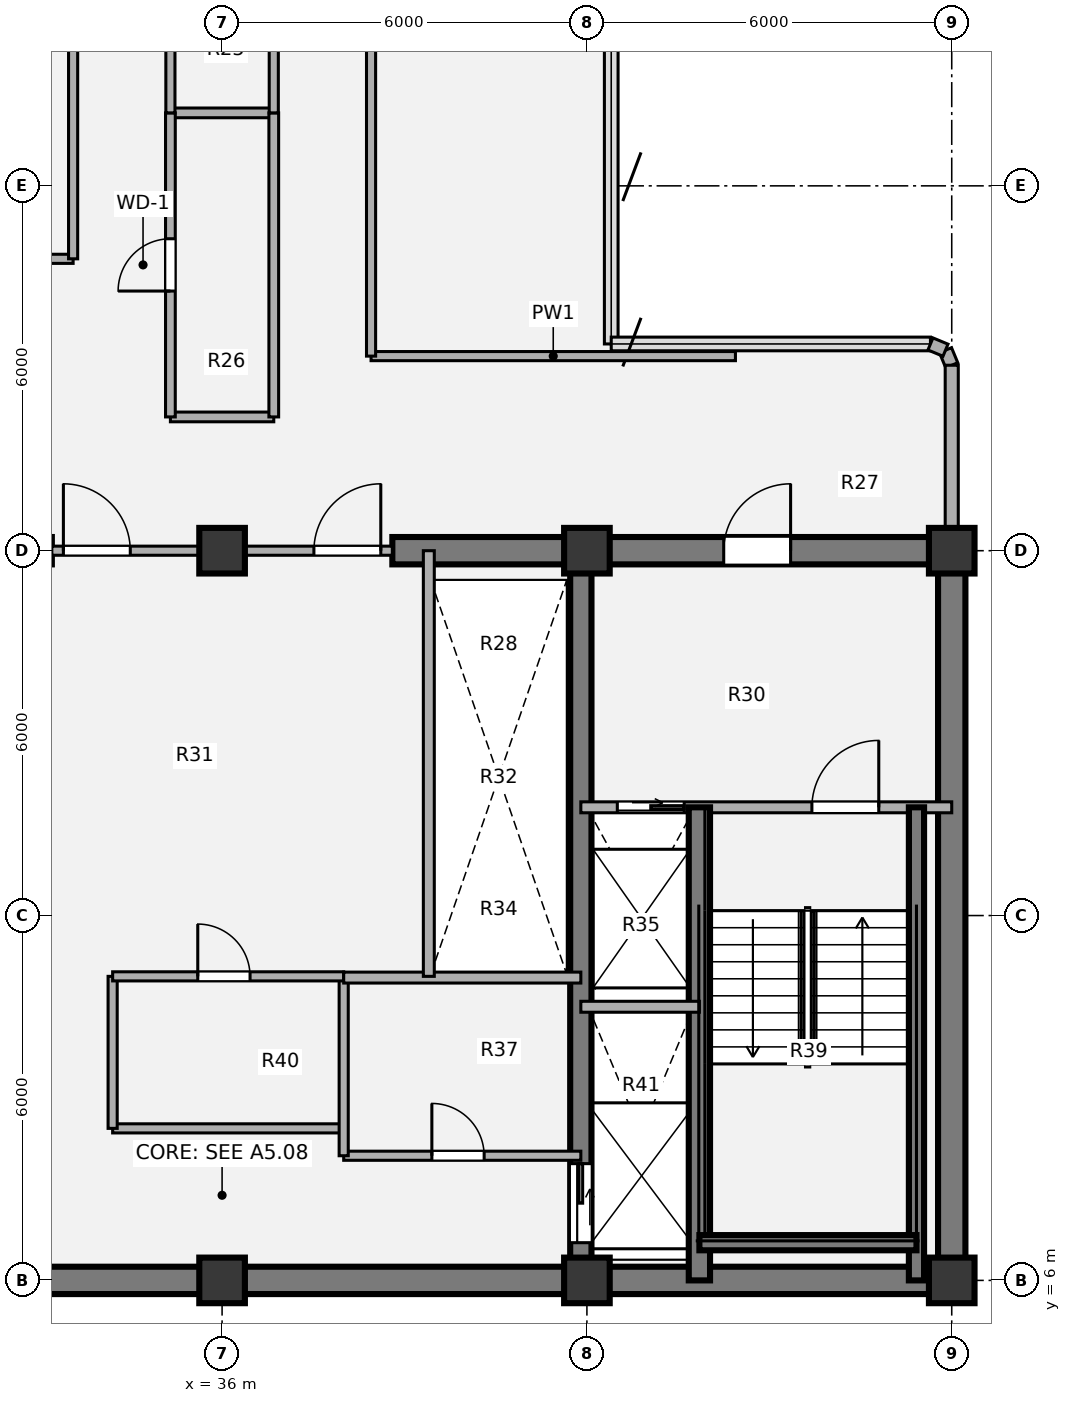
"""IFC4 building model, lengths in metres.
Left out: names, types, materials, properties, quantities, classifications, styles, units other than length and angle.
Written with IfcOpenShell. Run it as: python <this file> out.ifc"""

import sys

from ifc_helpers import new_model, si_unit, direction, frame, frame_2d, origin, origin_2d, place, context, subcontext, project, spatial, rectangle, extrude, source, transform, mapped, element, fill, save


model = new_model("IFC4")
c1 = context("Model", 3, precision=1e-05, world=origin(), true_north=direction((0.0, 1.0)))
c2 = subcontext(c1, "Body", "Model", "MODEL_VIEW")
j1 = project(units=[si_unit("LENGTHUNIT", "METRE"), si_unit("PLANEANGLEUNIT", "RADIAN")], contexts=[c1])
p1 = place(None, origin())
s1 = spatial("IfcSite", under=j1, at=p1, CompositionType="ELEMENT")
p2 = place(p1, origin())
s2 = spatial("IfcBuilding", under=s1, at=p2, CompositionType="ELEMENT")
p3 = place(p2, frame((0.0, 0.0, 209.34)))
s3 = spatial("IfcBuildingStorey", under=s2, at=p3, CompositionType="ELEMENT", Elevation=209.34)
m1 = source(origin(), c2, "Body", "SweptSolid", [
    extrude(rectangle(XDim=0.75, YDim=0.75, at=origin_2d()), origin(), (0.0, 0.0, 1.0), 3.78),
])
for number, where, z_axis, x_axis in (
    (1, (36.0, 6.0, 0.0), (0.0, 0.0, 1.0), (1.0, 0.0, 0.0)),
    (2, (42.0, 6.0, 0.0), (0.0, 0.0, 1.0), (1.0, 0.0, 0.0)),
    (3, (48.0, 6.0, 0.0), (0.0, 0.0, 1.0), (1.0, 0.0, 0.0)),
    (4, (36.0, 18.0, 0.0), (0.0, 0.0, 1.0), (1.0, 0.0, 0.0)),
    (5, (42.0, 18.0, 0.0), (0.0, 0.0, 1.0), (1.0, 0.0, 0.0)),
    (6, (48.0, 18.0, 0.0), (0.0, 0.0, 1.0), (1.0, 0.0, 0.0)),
):
    element("IfcColumn", number, at=place(p3, frame(where, z_axis=z_axis, x_axis=x_axis)), inside=s3, PredefinedType="COLUMN", context=c2, shape_type="MappedRepresentation", body=[
        mapped(m1, transform((0.0, 0.0, 0.0), x_axis=(1.0, 0.0, 0.0), y_axis=(0.0, 1.0, 0.0), z_axis=(0.0, 0.0, 1.0), scale=1.0)),
    ])
p4 = place(p3, frame((48.225, 6.0, 0.0), z_axis=(0.0, 0.0, 1.0), x_axis=(-1.0, 0.0, 0.0)))
e7 = element("IfcWall", 7, at=p4, inside=s3, PredefinedType="SHEAR", context=c2, shape_type="SweptSolid", body=[
    extrude(rectangle(XDim=24.45, YDim=0.45, at=frame_2d((12.225, 0.0))), origin(), (0.0, 0.0, 1.0), 3.78),
])
p5 = place(p3, frame((48.0, 18.0, 0.0), z_axis=(0.0, 0.0, 1.0), x_axis=(0.0, -1.0, 0.0)))
e8 = element("IfcWall", 8, at=p5, inside=s3, PredefinedType="SHEAR", context=c2, shape_type="SweptSolid", body=[
    extrude(rectangle(XDim=12.0, YDim=0.45, at=frame_2d((6.0, 0.0))), origin(), (0.0, 0.0, 1.0), 3.78),
])
p6 = place(p3, frame((38.8, 18.0, 0.0), z_axis=(0.0, 0.0, 1.0), x_axis=(1.0, 0.0, 0.0)))
e9 = element("IfcWall", 9, at=p6, inside=s3, PredefinedType="SHEAR", context=c2, shape_type="SweptSolid", body=[
    extrude(rectangle(XDim=9.425, YDim=0.45, at=frame_2d((4.712, 0.0))), origin(), (0.0, 0.0, 1.0), 3.78),
])
p7 = place(p6, frame((5.45, 0.0, 0.0)))
e10 = element("IfcOpeningElement", 10, at=p7, cuts=e9, PredefinedType="OPENING", context=c2, shape_type="SweptSolid", body=[
    extrude(rectangle(XDim=1.1, YDim=2.1, at=origin_2d()), frame((0.55, 0.235, 1.05), z_axis=(0.0, -1.0, 0.0), x_axis=(1.0, 0.0, 0.0)), (0.0, 0.0, 1.0), 0.47),
])
p8 = place(p3, frame((41.9, 18.0, 0.0), z_axis=(0.0, 0.0, 1.0), x_axis=(0.0, -1.0, 0.0)))
e11 = element("IfcWall", 11, at=p8, inside=s3, PredefinedType="SHEAR", context=c2, shape_type="SweptSolid", body=[
    extrude(rectangle(XDim=12.0, YDim=0.35, at=frame_2d((6.0, 0.0))), origin(), (0.0, 0.0, 1.0), 3.78),
])
p9 = place(p8, frame((10.08, 0.0, 0.0)))
e12 = element("IfcOpeningElement", 12, at=p9, cuts=e11, PredefinedType="OPENING", context=c2, shape_type="SweptSolid", body=[
    extrude(rectangle(XDim=1.3, YDim=2.1, at=origin_2d()), frame((0.65, 0.185, 1.05), z_axis=(0.0, -1.0, 0.0), x_axis=(1.0, 0.0, 0.0)), (0.0, 0.0, 1.0), 0.37),
])
p10 = place(p3, frame((47.897, 21.298, 0.0), z_axis=(0.0, 0.0, 1.0), x_axis=(0.382673670509, -0.923883575944, 0.0)))
e13 = element("IfcWall", 13, at=p10, inside=s3, PredefinedType="SOLIDWALL", context=c2, shape_type="SweptSolid", body=[
    extrude(rectangle(XDim=0.268, YDim=0.215, at=frame_2d((0.134, 0.0))), origin(), (0.0, 0.0, 1.0), 3.372),
])
p11 = place(p3, frame((48.0, 21.05, 0.0), z_axis=(0.0, 0.0, 1.0), x_axis=(0.0, -1.0, 0.0)))
e14 = element("IfcWall", 14, at=p11, inside=s3, PredefinedType="SOLIDWALL", context=c2, shape_type="SweptSolid", body=[
    extrude(rectangle(XDim=2.695, YDim=0.215, at=frame_2d((1.348, 0.0))), origin(), (0.0, 0.0, 1.0), 1.86),
])
p12 = place(p3, frame((47.65, 21.4, 0.0), z_axis=(0.0, 0.0, 1.0), x_axis=(0.924205486139, -0.381895560841, 0.0)))
e15 = element("IfcWall", 15, at=p12, inside=s3, PredefinedType="SOLIDWALL", context=c2, shape_type="SweptSolid", body=[
    extrude(rectangle(XDim=0.268, YDim=0.215, at=frame_2d((0.134, 0.0))), origin(), (0.0, 0.0, 1.0), 3.372),
])
p13 = place(p3, frame((34.2, 8.5, 0.0), z_axis=(0.0, 0.0, 1.0), x_axis=(1.0, 0.0, 0.0)))
e16 = element("IfcWall", 16, at=p13, inside=s3, PredefinedType="PARTITIONING", context=c2, shape_type="SweptSolid", body=[
    extrude(rectangle(XDim=3.8, YDim=0.15, at=frame_2d((1.9, 0.0))), origin(), (0.0, 0.0, 1.0), 3.342),
])
p14 = place(p3, frame((38.0, 8.05, 0.0), z_axis=(0.0, 0.0, 1.0), x_axis=(1.0, 0.0, 0.0)))
e17 = element("IfcWall", 17, at=p14, inside=s3, PredefinedType="PARTITIONING", context=c2, shape_type="SweptSolid", body=[
    extrude(rectangle(XDim=3.9, YDim=0.15, at=frame_2d((1.95, 0.0))), origin(), (0.0, 0.0, 1.0), 3.342),
])
p15 = place(p14, frame((1.45, 0.0, 0.0)))
e18 = element("IfcOpeningElement", 18, at=p15, cuts=e17, PredefinedType="OPENING", context=c2, shape_type="SweptSolid", body=[
    extrude(rectangle(XDim=0.86, YDim=2.1, at=origin_2d()), frame((0.43, 0.085, 1.05), z_axis=(0.0, -1.0, 0.0), x_axis=(1.0, 0.0, 0.0)), (0.0, 0.0, 1.0), 0.17),
])
p16 = place(p3, frame((34.2, 8.5, 0.0), z_axis=(0.0, 0.0, 1.0), x_axis=(0.0, 1.0, 0.0)))
e19 = element("IfcWall", 19, at=p16, inside=s3, PredefinedType="PARTITIONING", context=c2, shape_type="SweptSolid", body=[
    extrude(rectangle(XDim=2.5, YDim=0.15, at=frame_2d((1.25, 0.0))), origin(), (0.0, 0.0, 1.0), 3.342),
])
p17 = place(p3, frame((38.0, 8.05, 0.0), z_axis=(0.0, 0.0, 1.0), x_axis=(0.0, 1.0, 0.0)))
e20 = element("IfcWall", 20, at=p17, inside=s3, PredefinedType="PARTITIONING", context=c2, shape_type="SweptSolid", body=[
    extrude(rectangle(XDim=2.95, YDim=0.15, at=frame_2d((1.475, 0.0))), origin(), (0.0, 0.0, 1.0), 3.342),
])
p18 = place(p3, frame((34.2, 11.0, 0.0), z_axis=(0.0, 0.0, 1.0), x_axis=(1.0, 0.0, 0.0)))
e21 = element("IfcWall", 21, at=p18, inside=s3, PredefinedType="PARTITIONING", context=c2, shape_type="SweptSolid", body=[
    extrude(rectangle(XDim=3.8, YDim=0.15, at=frame_2d((1.9, 0.0))), origin(), (0.0, 0.0, 1.0), 3.342),
])
p19 = place(p18, frame((1.4, 0.0, 0.0)))
e22 = element("IfcOpeningElement", 22, at=p19, cuts=e21, PredefinedType="OPENING", context=c2, shape_type="SweptSolid", body=[
    extrude(rectangle(XDim=0.86, YDim=2.1, at=origin_2d()), frame((0.43, 0.085, 1.05), z_axis=(0.0, -1.0, 0.0), x_axis=(1.0, 0.0, 0.0)), (0.0, 0.0, 1.0), 0.17),
])
p20 = place(p3, frame((38.0, 10.98, 0.0), z_axis=(0.0, 0.0, 1.0), x_axis=(1.0, 0.0, 0.0)))
e23 = element("IfcWall", 23, at=p20, inside=s3, PredefinedType="PARTITIONING", context=c2, shape_type="SweptSolid", body=[
    extrude(rectangle(XDim=3.9, YDim=0.18, at=frame_2d((1.95, 0.0))), origin(), (0.0, 0.0, 1.0), 3.342),
])
p21 = place(p3, frame((39.4, 11.0, 0.0), z_axis=(0.0, 0.0, 1.0), x_axis=(0.0, 1.0, 0.0)))
e24 = element("IfcWall", 24, at=p21, inside=s3, PredefinedType="PARTITIONING", context=c2, shape_type="SweptSolid", body=[
    extrude(rectangle(XDim=7.0, YDim=0.18, at=frame_2d((3.5, 0.0))), origin(), (0.0, 0.0, 1.0), 3.342),
])
p22 = place(p3, frame((33.2, 18.0, 0.0), z_axis=(0.0, 0.0, 1.0), x_axis=(1.0, 0.0, 0.0)))
e25 = element("IfcWall", 25, at=p22, inside=s3, PredefinedType="PARTITIONING", context=c2, shape_type="SweptSolid", body=[
    extrude(rectangle(XDim=5.6, YDim=0.15, at=frame_2d((2.8, 0.0))), origin(), (0.0, 0.0, 1.0), 2.357),
])
p23 = place(p22, frame((0.19, 0.0, 0.0)))
e26 = element("IfcOpeningElement", 26, at=p23, cuts=e25, PredefinedType="OPENING", context=c2, shape_type="SweptSolid", body=[
    extrude(rectangle(XDim=1.1, YDim=2.1, at=origin_2d()), frame((0.55, 0.085, 1.05), z_axis=(0.0, -1.0, 0.0), x_axis=(1.0, 0.0, 0.0)), (0.0, 0.0, 1.0), 0.17),
])
p24 = place(p22, frame((4.31, 0.0, 0.0)))
e27 = element("IfcOpeningElement", 27, at=p24, cuts=e25, PredefinedType="OPENING", context=c2, shape_type="SweptSolid", body=[
    extrude(rectangle(XDim=1.1, YDim=2.1, at=origin_2d()), frame((0.55, 0.085, 1.05), z_axis=(0.0, -1.0, 0.0), x_axis=(1.0, 0.0, 0.0)), (0.0, 0.0, 1.0), 0.17),
])
p25 = place(p3, frame((41.9, 13.78, 0.0), z_axis=(0.0, 0.0, 1.0), x_axis=(1.0, 0.0, 0.0)))
e28 = element("IfcWall", 28, at=p25, inside=s3, PredefinedType="PARTITIONING", context=c2, shape_type="SweptSolid", body=[
    extrude(rectangle(XDim=6.1, YDim=0.18, at=frame_2d((3.05, 0.0))), origin(), (0.0, 0.0, 1.0), 3.342),
])
p26 = place(p25, frame((0.6, 0.0, 0.0)))
e29 = element("IfcOpeningElement", 29, at=p26, cuts=e28, PredefinedType="OPENING", context=c2, shape_type="SweptSolid", body=[
    extrude(rectangle(XDim=1.1, YDim=2.1, at=origin_2d()), frame((0.55, 0.1, 1.05), z_axis=(0.0, -1.0, 0.0), x_axis=(1.0, 0.0, 0.0)), (0.0, 0.0, 1.0), 0.2),
])
p27 = place(p25, frame((3.8, 0.0, 0.0)))
e30 = element("IfcOpeningElement", 30, at=p27, cuts=e28, PredefinedType="OPENING", context=c2, shape_type="SweptSolid", body=[
    extrude(rectangle(XDim=1.1, YDim=2.1, at=origin_2d()), frame((0.55, 0.1, 1.05), z_axis=(0.0, -1.0, 0.0), x_axis=(1.0, 0.0, 0.0)), (0.0, 0.0, 1.0), 0.2),
])
p28 = place(p3, frame((43.85, 6.0, 0.0), z_axis=(0.0, 0.0, 1.0), x_axis=(0.0, 1.0, 0.0)))
e31 = element("IfcWall", 31, at=p28, inside=s3, PredefinedType="SHEAR", context=c2, shape_type="SweptSolid", body=[
    extrude(rectangle(XDim=7.78, YDim=0.35, at=frame_2d((3.89, 0.0))), origin(), (0.0, 0.0, 1.0), 3.692),
])
p29 = place(p3, frame((47.42, 6.0, 0.0), z_axis=(0.0, 0.0, 1.0), x_axis=(0.0, 1.0, 0.0)))
e32 = element("IfcWall", 32, at=p29, inside=s3, PredefinedType="SHEAR", context=c2, shape_type="SweptSolid", body=[
    extrude(rectangle(XDim=7.78, YDim=0.25, at=frame_2d((3.89, 0.0))), origin(), (0.0, 0.0, 1.0), 3.692),
])
p30 = place(p3, frame((43.85, 6.62, 0.0), z_axis=(0.0, 0.0, 1.0), x_axis=(1.0, 0.0, 0.0)))
e33 = element("IfcWall", 33, at=p30, inside=s3, PredefinedType="SHEAR", context=c2, shape_type="SweptSolid", body=[
    extrude(rectangle(XDim=3.57, YDim=0.25, at=frame_2d((1.785, 0.0))), origin(), (0.0, 0.0, 1.0), 3.692),
])
p31 = place(p3, frame((41.9, 10.5, 0.0), z_axis=(0.0, 0.0, 1.0), x_axis=(1.0, 0.0, 0.0)))
e34 = element("IfcWall", 34, at=p31, inside=s3, PredefinedType="PARTITIONING", context=c2, shape_type="SweptSolid", body=[
    extrude(rectangle(XDim=1.95, YDim=0.18, at=frame_2d((0.975, 0.0))), origin(), (0.0, 0.0, 1.0), 3.342),
])
p32 = place(p3, frame((35.15, 20.2, 0.0), z_axis=(0.0, 0.0, 1.0), x_axis=(1.0, 0.0, 0.0)))
e35 = element("IfcWall", 35, at=p32, inside=s3, PredefinedType="PLUMBINGWALL", context=c2, shape_type="SweptSolid", body=[
    extrude(rectangle(XDim=1.7, YDim=0.16, at=frame_2d((0.85, 0.0))), origin(), (0.0, 0.0, 1.0), 3.342),
])
p33 = place(p3, frame((38.45, 21.2, 0.0), z_axis=(0.0, 0.0, 1.0), x_axis=(1.0, 0.0, 0.0)))
e36 = element("IfcWall", 36, at=p33, inside=s3, PredefinedType="PARTITIONING", context=c2, shape_type="SweptSolid", body=[
    extrude(rectangle(XDim=5.993, YDim=0.15, at=frame_2d((2.996, 0.0))), origin(), (0.0, 0.0, 1.0), 3.342),
])
p34 = place(p3, frame((29.68, 22.8, 0.0), z_axis=(0.0, 0.0, 1.0), x_axis=(1.0, 0.0, 0.0)))
e37 = element("IfcWall", 37, at=p34, inside=s3, PredefinedType="PARTITIONING", context=c2, shape_type="SweptSolid", body=[
    extrude(rectangle(XDim=3.87, YDim=0.15, at=frame_2d((1.935, 0.0))), origin(), (0.0, 0.0, 1.0), 3.342),
])
p35 = place(p3, frame((35.15, 25.2, 0.0), z_axis=(0.0, 0.0, 1.0), x_axis=(1.0, 0.0, 0.0)))
e38 = element("IfcWall", 38, at=p35, inside=s3, PredefinedType="PLUMBINGWALL", context=c2, shape_type="SweptSolid", body=[
    extrude(rectangle(XDim=1.7, YDim=0.16, at=frame_2d((0.85, 0.0))), origin(), (0.0, 0.0, 1.0), 3.342),
])
p36 = place(p3, frame((33.55, 22.8, 0.0), z_axis=(0.0, 0.0, 1.0), x_axis=(0.0, 1.0, 0.0)))
e39 = element("IfcWall", 39, at=p36, inside=s3, PredefinedType="PARTITIONING", context=c2, shape_type="SweptSolid", body=[
    extrude(rectangle(XDim=9.8, YDim=0.15, at=frame_2d((4.9, 0.0))), origin(), (0.0, 0.0, 1.0), 3.342),
])
p37 = place(p36, frame((4.34, 0.0, 0.0)))
e40 = element("IfcOpeningElement", 40, at=p37, cuts=e39, PredefinedType="OPENING", context=c2, shape_type="SweptSolid", body=[
    extrude(rectangle(XDim=0.86, YDim=2.1, at=origin_2d()), frame((0.43, 0.085, 1.05), z_axis=(0.0, -1.0, 0.0), x_axis=(1.0, 0.0, 0.0)), (0.0, 0.0, 1.0), 0.17),
])
p38 = place(p3, frame((35.15, 20.2, 0.0), z_axis=(0.0, 0.0, 1.0), x_axis=(0.0, 1.0, 0.0)))
e41 = element("IfcWall", 41, at=p38, inside=s3, PredefinedType="PLUMBINGWALL", context=c2, shape_type="SweptSolid", body=[
    extrude(rectangle(XDim=5.0, YDim=0.16, at=frame_2d((2.5, 0.0))), origin(), (0.0, 0.0, 1.0), 3.342),
])
p39 = place(p38, frame((2.07, 0.0, 0.0)))
e42 = element("IfcOpeningElement", 42, at=p39, cuts=e41, PredefinedType="OPENING", context=c2, shape_type="SweptSolid", body=[
    extrude(rectangle(XDim=0.86, YDim=2.1, at=origin_2d()), frame((0.43, 0.09, 1.05), z_axis=(0.0, -1.0, 0.0), x_axis=(1.0, 0.0, 0.0)), (0.0, 0.0, 1.0), 0.18),
])
p40 = place(p3, frame((35.15, 25.2, 0.0), z_axis=(0.0, 0.0, 1.0), x_axis=(0.0, 1.0, 0.0)))
e43 = element("IfcWall", 43, at=p40, inside=s3, PredefinedType="PARTITIONING", context=c2, shape_type="SweptSolid", body=[
    extrude(rectangle(XDim=15.46, YDim=0.15, at=frame_2d((7.73, 0.0))), origin(), (0.0, 0.0, 1.0), 3.342),
])
p41 = place(p3, frame((36.85, 20.2, 0.0), z_axis=(0.0, 0.0, 1.0), x_axis=(0.0, 1.0, 0.0)))
e44 = element("IfcWall", 44, at=p41, inside=s3, PredefinedType="PLUMBINGWALL", context=c2, shape_type="SweptSolid", body=[
    extrude(rectangle(XDim=5.0, YDim=0.16, at=frame_2d((2.5, 0.0))), origin(), (0.0, 0.0, 1.0), 3.342),
])
p42 = place(p3, frame((36.85, 25.2, 0.0), z_axis=(0.0, 0.0, 1.0), x_axis=(0.0, 1.0, 0.0)))
e45 = element("IfcWall", 45, at=p42, inside=s3, PredefinedType="PARTITIONING", context=c2, shape_type="SweptSolid", body=[
    extrude(rectangle(XDim=15.46, YDim=0.15, at=frame_2d((7.73, 0.0))), origin(), (0.0, 0.0, 1.0), 3.342),
])
p43 = place(p42, frame((7.205, 0.0, 0.0)))
e46 = element("IfcOpeningElement", 46, at=p43, cuts=e45, PredefinedType="OPENING", context=c2, shape_type="SweptSolid", body=[
    extrude(rectangle(XDim=1.05, YDim=2.1, at=origin_2d()), frame((0.525, 0.085, 1.05), z_axis=(0.0, -1.0, 0.0), x_axis=(1.0, 0.0, 0.0)), (0.0, 0.0, 1.0), 0.17),
])
p44 = place(p3, frame((38.45, 21.2, 0.0), z_axis=(0.0, 0.0, 1.0), x_axis=(0.0, 1.0, 0.0)))
e47 = element("IfcWall", 47, at=p44, inside=s3, PredefinedType="PARTITIONING", context=c2, shape_type="SweptSolid", body=[
    extrude(rectangle(XDim=11.4, YDim=0.15, at=frame_2d((5.7, 0.0))), origin(), (0.0, 0.0, 1.0), 3.342),
])
p45 = place(p44, frame((5.075, 0.0, 0.0)))
e48 = element("IfcOpeningElement", 48, at=p45, cuts=e47, PredefinedType="OPENING", context=c2, shape_type="SweptSolid", body=[
    extrude(rectangle(XDim=1.05, YDim=2.1, at=origin_2d()), frame((0.525, 0.085, 1.05), z_axis=(0.0, -1.0, 0.0), x_axis=(1.0, 0.0, 0.0)), (0.0, 0.0, 1.0), 0.17),
])
m2 = source(origin(), c2, "Body", "SweptSolid", [
    extrude(rectangle(XDim=0.86, YDim=2.1, at=origin_2d()), frame((0.43, 0.025, 1.05), z_axis=(0.0, -1.0, 0.0), x_axis=(1.0, 0.0, 0.0)), (0.0, 0.0, 1.0), 0.05),
])
p46 = place(p15, origin())
e49 = element("IfcDoor", 49, at=p46, inside=s3, OperationType="SINGLE_SWING_LEFT", PredefinedType="DOOR", context=c2, shape_type="MappedRepresentation", body=[
    mapped(m2, transform((0.0, 0.0, 0.0), x_axis=(1.0, 0.0, 0.0), y_axis=(0.0, 1.0, 0.0), z_axis=(0.0, 0.0, 1.0), scale=1.0)),
])
fill(e18, e49)
p47 = place(p19, origin())
e50 = element("IfcDoor", 50, at=p47, inside=s3, OperationType="SINGLE_SWING_LEFT", PredefinedType="DOOR", context=c2, shape_type="MappedRepresentation", body=[
    mapped(m2, transform((0.0, 0.0, 0.0), x_axis=(1.0, 0.0, 0.0), y_axis=(0.0, 1.0, 0.0), z_axis=(0.0, 0.0, 1.0), scale=1.0)),
])
fill(e22, e50)
m3 = source(origin(), c2, "Body", "SweptSolid", [
    extrude(rectangle(XDim=1.1, YDim=2.1, at=origin_2d()), frame((0.55, 0.025, 1.05), z_axis=(0.0, -1.0, 0.0), x_axis=(1.0, 0.0, 0.0)), (0.0, 0.0, 1.0), 0.05),
])
p48 = place(p23, origin())
e51 = element("IfcDoor", 51, at=p48, inside=s3, OperationType="SINGLE_SWING_LEFT", PredefinedType="DOOR", context=c2, shape_type="MappedRepresentation", body=[
    mapped(m3, transform((0.0, 0.0, 0.0), x_axis=(1.0, 0.0, 0.0), y_axis=(0.0, 1.0, 0.0), z_axis=(0.0, 0.0, 1.0), scale=1.0)),
])
fill(e26, e51)
p49 = place(p24, origin())
e52 = element("IfcDoor", 52, at=p49, inside=s3, OperationType="SINGLE_SWING_RIGHT", PredefinedType="DOOR", context=c2, shape_type="MappedRepresentation", body=[
    mapped(m3, transform((0.0, 0.0, 0.0), x_axis=(1.0, 0.0, 0.0), y_axis=(0.0, 1.0, 0.0), z_axis=(0.0, 0.0, 1.0), scale=1.0)),
])
fill(e27, e52)
m4 = source(origin(), c2, "Body", "SweptSolid", [
    extrude(rectangle(XDim=1.1, YDim=2.1, at=origin_2d()), frame((0.55, 0.025, 1.05), z_axis=(0.0, -1.0, 0.0), x_axis=(1.0, 0.0, 0.0)), (0.0, 0.0, 1.0), 0.05),
])
p50 = place(p26, origin())
e53 = element("IfcDoor", 53, at=p50, inside=s3, OperationType="SLIDING_TO_RIGHT", PredefinedType="DOOR", context=c2, shape_type="MappedRepresentation", body=[
    mapped(m4, transform((0.0, 0.0, 0.0), x_axis=(1.0, 0.0, 0.0), y_axis=(0.0, 1.0, 0.0), z_axis=(0.0, 0.0, 1.0), scale=1.0)),
])
fill(e29, e53)
m5 = source(origin(), c2, "Body", "SweptSolid", [
    extrude(rectangle(XDim=1.1, YDim=2.1, at=origin_2d()), frame((0.55, 0.025, 1.05), z_axis=(0.0, -1.0, 0.0), x_axis=(1.0, 0.0, 0.0)), (0.0, 0.0, 1.0), 0.05),
])
p51 = place(p27, origin())
e54 = element("IfcDoor", 54, at=p51, inside=s3, OperationType="SINGLE_SWING_RIGHT", PredefinedType="DOOR", context=c2, shape_type="MappedRepresentation", body=[
    mapped(m5, transform((0.0, 0.0, 0.0), x_axis=(1.0, 0.0, 0.0), y_axis=(0.0, 1.0, 0.0), z_axis=(0.0, 0.0, 1.0), scale=1.0)),
])
fill(e30, e54)
m6 = source(origin(), c2, "Body", "SweptSolid", [
    extrude(rectangle(XDim=1.3, YDim=2.1, at=origin_2d()), frame((0.65, 0.025, 1.05), z_axis=(0.0, -1.0, 0.0), x_axis=(1.0, 0.0, 0.0)), (0.0, 0.0, 1.0), 0.05),
])
p52 = place(p9, origin())
e55 = element("IfcDoor", 55, at=p52, inside=s3, OperationType="SLIDING_TO_LEFT", PredefinedType="DOOR", context=c2, shape_type="MappedRepresentation", body=[
    mapped(m6, transform((0.0, 0.0, 0.0), x_axis=(1.0, 0.0, 0.0), y_axis=(0.0, 1.0, 0.0), z_axis=(0.0, 0.0, 1.0), scale=1.0)),
])
fill(e12, e55)
p53 = place(p7, origin())
e56 = element("IfcDoor", 56, at=p53, inside=s3, OperationType="SINGLE_SWING_RIGHT", PredefinedType="DOOR", context=c2, shape_type="MappedRepresentation", body=[
    mapped(m3, transform((0.0, 0.0, 0.0), x_axis=(1.0, 0.0, 0.0), y_axis=(0.0, 1.0, 0.0), z_axis=(0.0, 0.0, 1.0), scale=1.0)),
])
fill(e10, e56)
m7 = source(origin(), c2, "Body", "SweptSolid", [
    extrude(rectangle(XDim=0.86, YDim=2.1, at=origin_2d()), frame((0.43, 0.025, 1.05), z_axis=(0.0, -1.0, 0.0), x_axis=(1.0, 0.0, 0.0)), (0.0, 0.0, 1.0), 0.05),
])
p54 = place(p39, origin())
e57 = element("IfcDoor", 57, at=p54, inside=s3, OperationType="SINGLE_SWING_LEFT", PredefinedType="DOOR", context=c2, shape_type="MappedRepresentation", body=[
    mapped(m7, transform((0.0, 0.0, 0.0), x_axis=(1.0, 0.0, 0.0), y_axis=(0.0, 1.0, 0.0), z_axis=(0.0, 0.0, 1.0), scale=1.0)),
])
fill(e42, e57)
save(model, sys.argv[1])
